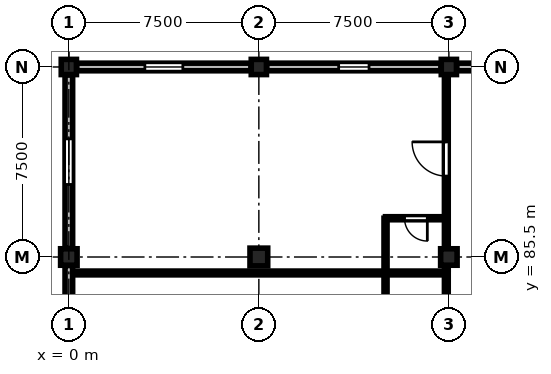
"""IFC4 building model, lengths in metres.
Left out: names, types, materials, properties, quantities, classifications, styles, units other than length and angle.
Written with IfcOpenShell. Run it as: python <this file> out.ifc"""

import sys

from ifc_helpers import new_model, si_unit, direction, frame, frame_2d, origin, origin_2d, place, context, subcontext, project, spatial, rectangle, circle, extrude, element, fill, save


model = new_model("IFC4")
c1 = context("Model", 3, precision=1e-05, world=origin(), true_north=direction((0.0, 1.0)))
c2 = subcontext(c1, "Body", "Model", "MODEL_VIEW")
j1 = project(units=[si_unit("LENGTHUNIT", "METRE"), si_unit("PLANEANGLEUNIT", "RADIAN")], contexts=[c1])
p1 = place(None, origin())
s1 = spatial("IfcSite", under=j1, at=p1, CompositionType="ELEMENT")
p2 = place(p1, origin())
s2 = spatial("IfcBuilding", under=s1, at=p2, CompositionType="ELEMENT")
p3 = place(p2, frame((0.0, 0.0, 14.1)))
s3 = spatial("IfcBuildingStorey", under=s2, at=p3, CompositionType="ELEMENT", Elevation=14.1)
p4 = place(p3, frame((0.0, 85.5, 0.0), z_axis=(0.0, 0.0, 1.0), x_axis=(1.0, 0.0, 0.0)))
e1 = element("IfcColumn", 1, at=p4, inside=s3, PredefinedType="COLUMN", context=c2, shape_type="SweptSolid", body=[
    extrude(rectangle(XDim=0.65, YDim=0.65, at=origin_2d()), origin(), (0.0, 0.0, 1.0), 3.75),
])
p5 = place(p3, frame((0.0, 93.0, 0.0), z_axis=(0.0, 0.0, 1.0), x_axis=(1.0, 0.0, 0.0)))
e2 = element("IfcColumn", 2, at=p5, inside=s3, PredefinedType="COLUMN", context=c2, shape_type="SweptSolid", body=[
    extrude(circle(Radius=0.3, at=origin_2d()), origin(), (0.0, 0.0, 1.0), 3.75),
])
p6 = place(p3, frame((7.5, 85.5, 0.0), z_axis=(0.0, 0.0, 1.0), x_axis=(1.0, 0.0, 0.0)))
e3 = element("IfcColumn", 3, at=p6, inside=s3, PredefinedType="COLUMN", context=c2, shape_type="SweptSolid", body=[
    extrude(rectangle(XDim=0.7, YDim=0.7, at=origin_2d()), origin(), (0.0, 0.0, 1.0), 3.75),
])
p7 = place(p3, frame((7.5, 93.0, 0.0), z_axis=(0.0, 0.0, 1.0), x_axis=(1.0, 0.0, 0.0)))
e4 = element("IfcColumn", 4, at=p7, inside=s3, PredefinedType="COLUMN", context=c2, shape_type="SweptSolid", body=[
    extrude(rectangle(XDim=0.6, YDim=0.6, at=origin_2d()), origin(), (0.0, 0.0, 1.0), 3.75),
])
p8 = place(p3, frame((15.0, 85.5, 0.0), z_axis=(0.0, 0.0, 1.0), x_axis=(1.0, 0.0, 0.0)))
e5 = element("IfcColumn", 5, at=p8, inside=s3, PredefinedType="COLUMN", context=c2, shape_type="SweptSolid", body=[
    extrude(rectangle(XDim=0.65, YDim=0.65, at=origin_2d()), origin(), (0.0, 0.0, 1.0), 3.75),
])
p9 = place(p3, frame((15.0, 93.0, 0.0), z_axis=(0.0, 0.0, 1.0), x_axis=(1.0, 0.0, 0.0)))
e6 = element("IfcColumn", 6, at=p9, inside=s3, PredefinedType="COLUMN", context=c2, shape_type="SweptSolid", body=[
    extrude(rectangle(XDim=0.6, YDim=0.6, at=origin_2d()), origin(), (0.0, 0.0, 1.0), 3.75),
])
p10 = place(p3, frame((0.0, 76.885, 0.0), z_axis=(0.0, 0.0, 1.0), x_axis=(0.0, 1.0, 0.0)))
e7 = element("IfcWall", 7, at=p10, inside=s3, PredefinedType="STANDARD", context=c2, shape_type="SweptSolid", body=[
    extrude(rectangle(XDim=8.28, YDim=0.3, at=frame_2d((4.14, 0.0))), origin(), (0.0, 0.0, 1.0), 2.92),
])
p11 = place(p10, frame((2.94, 0.0, 0.9)))
e8 = element("IfcOpeningElement", 8, at=p11, cuts=e7, PredefinedType="OPENING", context=c2, shape_type="SweptSolid", body=[
    extrude(rectangle(XDim=2.4, YDim=1.74, at=frame_2d((1.2, 0.87))), frame((0.0, 0.16, 0.0), z_axis=(0.0, -1.0, 0.0), x_axis=(1.0, 0.0, 0.0)), (0.0, 0.0, 1.0), 0.32),
])
p12 = place(p3, frame((0.31, 93.0, 0.0), z_axis=(0.0, 0.0, 1.0), x_axis=(1.0, 0.0, 0.0)))
e9 = element("IfcWall", 9, at=p12, inside=s3, PredefinedType="STANDARD", context=c2, shape_type="SweptSolid", body=[
    extrude(rectangle(XDim=6.88, YDim=0.3, at=frame_2d((3.44, 0.0))), origin(), (0.0, 0.0, 1.0), 2.87),
])
p13 = place(p12, frame((2.69, 0.0, 0.9)))
e10 = element("IfcOpeningElement", 10, at=p13, cuts=e9, PredefinedType="OPENING", context=c2, shape_type="SweptSolid", body=[
    extrude(rectangle(XDim=1.5, YDim=1.69, at=frame_2d((0.75, 0.845))), frame((0.0, 0.16, 0.0), z_axis=(0.0, -1.0, 0.0), x_axis=(1.0, 0.0, 0.0)), (0.0, 0.0, 1.0), 0.32),
])
p14 = place(p3, frame((0.0, 85.835, 0.0), z_axis=(0.0, 0.0, 1.0), x_axis=(0.0, 1.0, 0.0)))
e11 = element("IfcWall", 11, at=p14, inside=s3, PredefinedType="STANDARD", context=c2, shape_type="SweptSolid", body=[
    extrude(rectangle(XDim=6.855, YDim=0.3, at=frame_2d((3.427, 0.0))), origin(), (0.0, 0.0, 1.0), 2.87),
])
p15 = place(p14, frame((2.528, 0.0, 0.9)))
e12 = element("IfcOpeningElement", 12, at=p15, cuts=e11, PredefinedType="OPENING", context=c2, shape_type="SweptSolid", body=[
    extrude(rectangle(XDim=1.8, YDim=1.69, at=frame_2d((0.9, 0.845))), frame((0.0, 0.16, 0.0), z_axis=(0.0, -1.0, 0.0), x_axis=(1.0, 0.0, 0.0)), (0.0, 0.0, 1.0), 0.32),
])
p16 = place(p3, frame((7.81, 93.0, 0.0), z_axis=(0.0, 0.0, 1.0), x_axis=(1.0, 0.0, 0.0)))
e13 = element("IfcWall", 13, at=p16, inside=s3, PredefinedType="STANDARD", context=c2, shape_type="SweptSolid", body=[
    extrude(rectangle(XDim=6.88, YDim=0.3, at=frame_2d((3.44, 0.0))), origin(), (0.0, 0.0, 1.0), 2.87),
])
p17 = place(p16, frame((2.84, 0.0, 0.9)))
e14 = element("IfcOpeningElement", 14, at=p17, cuts=e13, PredefinedType="OPENING", context=c2, shape_type="SweptSolid", body=[
    extrude(rectangle(XDim=1.2, YDim=1.69, at=frame_2d((0.6, 0.845))), frame((0.0, 0.16, 0.0), z_axis=(0.0, -1.0, 0.0), x_axis=(1.0, 0.0, 0.0)), (0.0, 0.0, 1.0), 0.32),
])
p18 = place(p3, frame((15.31, 93.0, 0.0), z_axis=(0.0, 0.0, 1.0), x_axis=(1.0, 0.0, 0.0)))
e15 = element("IfcWall", 15, at=p18, inside=s3, PredefinedType="STANDARD", context=c2, shape_type="SweptSolid", body=[
    extrude(rectangle(XDim=6.88, YDim=0.3, at=frame_2d((3.44, 0.0))), origin(), (0.0, 0.0, 1.0), 2.87),
])
p19 = place(p18, frame((2.39, 0.0, 0.9)))
e16 = element("IfcOpeningElement", 16, at=p19, cuts=e15, PredefinedType="OPENING", context=c2, shape_type="SweptSolid", body=[
    extrude(rectangle(XDim=2.1, YDim=1.69, at=frame_2d((1.05, 0.845))), frame((0.0, 0.16, 0.0), z_axis=(0.0, -1.0, 0.0), x_axis=(1.0, 0.0, 0.0)), (0.0, 0.0, 1.0), 0.32),
])
p20 = place(p3, frame((14.9, 77.33, 0.0), z_axis=(0.0, 0.0, 1.0), x_axis=(0.0, 1.0, 0.0)))
e17 = element("IfcWall", 17, at=p20, inside=s3, PredefinedType="PARTITIONING", context=c2, shape_type="SweptSolid", body=[
    extrude(rectangle(XDim=7.54, YDim=0.15, at=frame_2d((3.77, 0.0))), origin(), (0.0, 0.0, 1.0), 2.755),
])
p21 = place(p20, frame((3.095, 0.0, 0.0)))
e18 = element("IfcOpeningElement", 18, at=p21, cuts=e17, PredefinedType="OPENING", context=c2, shape_type="SweptSolid", body=[
    extrude(rectangle(XDim=1.35, YDim=2.25, at=frame_2d((0.675, 1.125))), frame((0.0, 0.085, 0.0), z_axis=(0.0, -1.0, 0.0), x_axis=(1.0, 0.0, 0.0)), (0.0, 0.0, 1.0), 0.17),
])
p22 = place(p3, frame((12.5, 82.87, 0.0), z_axis=(0.0, 0.0, 1.0), x_axis=(0.0, 1.0, 0.0)))
e19 = element("IfcWall", 19, at=p22, inside=s3, PredefinedType="PARTITIONING", context=c2, shape_type="SweptSolid", body=[
    extrude(rectangle(XDim=2.0, YDim=0.12, at=frame_2d((1.0, 0.0))), origin(), (0.0, 0.0, 1.0), 3.455),
])
p23 = place(p3, frame((14.9, 85.03, 0.0), z_axis=(0.0, 0.0, 1.0), x_axis=(0.0, 1.0, 0.0)))
e20 = element("IfcWall", 20, at=p23, inside=s3, PredefinedType="PARTITIONING", context=c2, shape_type="SweptSolid", body=[
    extrude(rectangle(XDim=7.54, YDim=0.15, at=frame_2d((3.77, 0.0))), origin(), (0.0, 0.0, 1.0), 2.755),
])
p24 = place(p23, frame((3.664, 0.0, 0.0)))
e21 = element("IfcOpeningElement", 21, at=p24, cuts=e20, PredefinedType="OPENING", context=c2, shape_type="SweptSolid", body=[
    extrude(rectangle(XDim=1.35, YDim=2.25, at=frame_2d((0.675, 1.125))), frame((0.0, 0.085, 0.0), z_axis=(0.0, -1.0, 0.0), x_axis=(1.0, 0.0, 0.0)), (0.0, 0.0, 1.0), 0.17),
])
p25 = place(p3, frame((14.9, 87.03, 0.0), z_axis=(0.0, 0.0, 1.0), x_axis=(-1.0, 0.0, 0.0)))
e22 = element("IfcWall", 22, at=p25, inside=s3, PredefinedType="PARTITIONING", context=c2, shape_type="SweptSolid", body=[
    extrude(rectangle(XDim=2.4, YDim=0.12, at=frame_2d((1.2, 0.0))), origin(), (0.0, 0.0, 1.0), 3.455),
])
p26 = place(p25, frame((0.75, 0.0, 0.0)))
e23 = element("IfcOpeningElement", 23, at=p26, cuts=e22, PredefinedType="OPENING", context=c2, shape_type="SweptSolid", body=[
    extrude(rectangle(XDim=0.9, YDim=2.1, at=frame_2d((0.45, 1.05))), frame((0.0, 0.07, 0.0), z_axis=(0.0, -1.0, 0.0), x_axis=(1.0, 0.0, 0.0)), (0.0, 0.0, 1.0), 0.14),
])
p27 = place(p3, frame((12.5, 85.03, 0.0), z_axis=(0.0, 0.0, 1.0), x_axis=(0.0, 1.0, 0.0)))
e24 = element("IfcWall", 24, at=p27, inside=s3, PredefinedType="PARTITIONING", context=c2, shape_type="SweptSolid", body=[
    extrude(rectangle(XDim=2.0, YDim=0.12, at=frame_2d((1.0, 0.0))), origin(), (0.0, 0.0, 1.0), 3.455),
])
p28 = place(p3, frame((0.35, 84.87, 0.0), z_axis=(0.0, 0.0, 1.0), x_axis=(1.0, 0.0, 0.0)))
e25 = element("IfcWall", 25, at=p28, inside=s3, PredefinedType="PARTITIONING", context=c2, shape_type="SweptSolid", body=[
    extrude(rectangle(XDim=14.55, YDim=0.15, at=frame_2d((7.275, 0.0))), origin(), (0.0, 0.0, 1.0), 3.455),
])
p29 = place(p13, origin())
e26 = element("IfcWindow", 26, at=p29, inside=s3, PartitioningType="SINGLE_PANEL", PredefinedType="WINDOW", context=c2, shape_type="SweptSolid", body=[
    extrude(rectangle(XDim=1.5, YDim=1.69, at=frame_2d((0.75, 0.845))), frame((0.0, 0.03, 0.0), z_axis=(0.0, -1.0, 0.0), x_axis=(1.0, 0.0, 0.0)), (0.0, 0.0, 1.0), 0.06),
])
fill(e10, e26)
p30 = place(p15, origin())
e27 = element("IfcWindow", 27, at=p30, inside=s3, PartitioningType="SINGLE_PANEL", PredefinedType="WINDOW", context=c2, shape_type="SweptSolid", body=[
    extrude(rectangle(XDim=1.8, YDim=1.69, at=frame_2d((0.9, 0.845))), frame((0.0, 0.03, 0.0), z_axis=(0.0, -1.0, 0.0), x_axis=(1.0, 0.0, 0.0)), (0.0, 0.0, 1.0), 0.06),
])
fill(e12, e27)
p31 = place(p17, origin())
e28 = element("IfcWindow", 28, at=p31, inside=s3, PartitioningType="SINGLE_PANEL", PredefinedType="WINDOW", context=c2, shape_type="SweptSolid", body=[
    extrude(rectangle(XDim=1.2, YDim=1.69, at=frame_2d((0.6, 0.845))), frame((0.0, 0.03, 0.0), z_axis=(0.0, -1.0, 0.0), x_axis=(1.0, 0.0, 0.0)), (0.0, 0.0, 1.0), 0.06),
])
fill(e14, e28)
p32 = place(p24, origin())
e29 = element("IfcDoor", 29, at=p32, inside=s3, OperationType="SINGLE_SWING_RIGHT", PredefinedType="DOOR", context=c2, shape_type="SweptSolid", body=[
    extrude(rectangle(XDim=1.35, YDim=2.25, at=frame_2d((0.675, 1.125))), frame((0.0, 0.025, 0.0), z_axis=(0.0, -1.0, 0.0), x_axis=(1.0, 0.0, 0.0)), (0.0, 0.0, 1.0), 0.05),
])
fill(e21, e29)
p33 = place(p26, origin())
e30 = element("IfcDoor", 30, at=p33, inside=s3, OperationType="SINGLE_SWING_LEFT", PredefinedType="DOOR", context=c2, shape_type="SweptSolid", body=[
    extrude(rectangle(XDim=0.9, YDim=2.1, at=frame_2d((0.45, 1.05))), frame((0.0, 0.025, 0.0), z_axis=(0.0, -1.0, 0.0), x_axis=(1.0, 0.0, 0.0)), (0.0, 0.0, 1.0), 0.05),
])
fill(e23, e30)
save(model, sys.argv[1])
